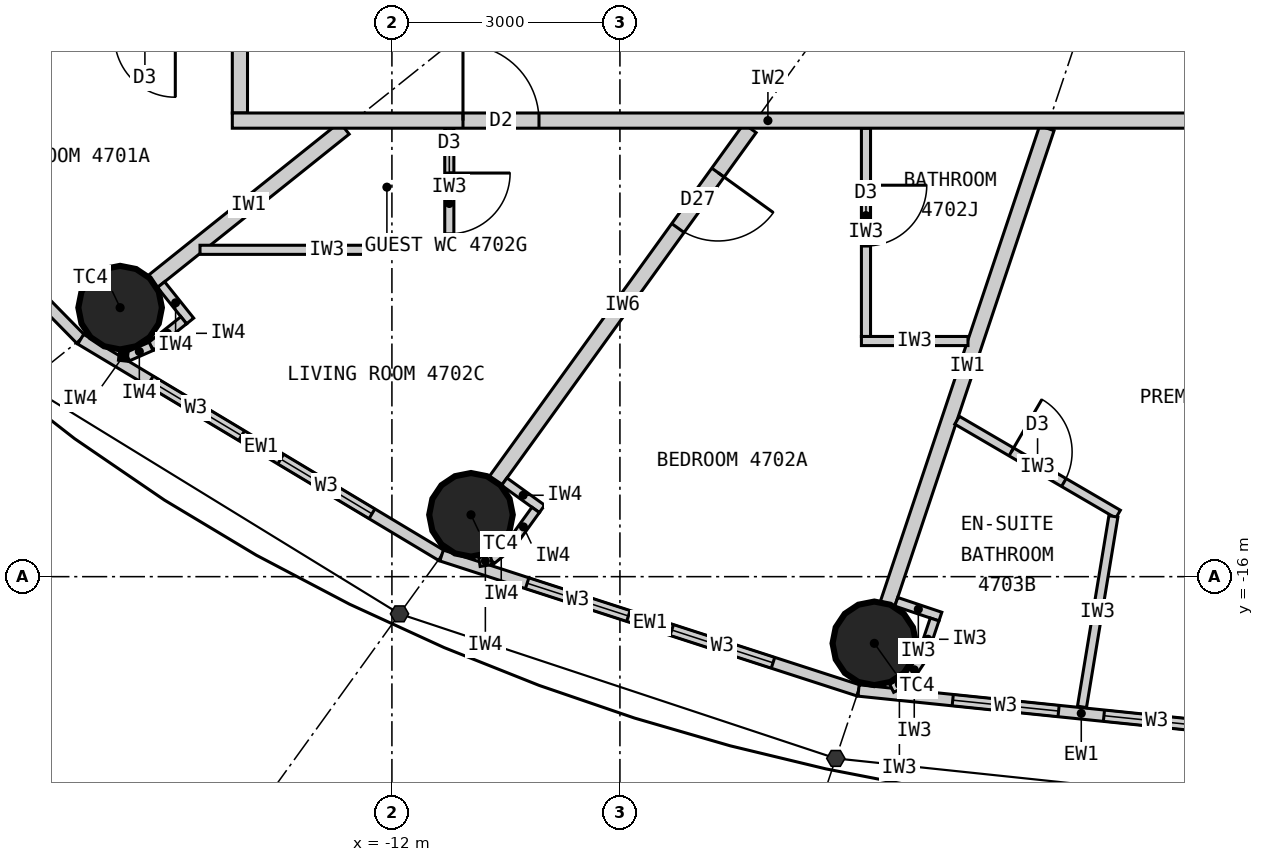
"""IFC4 building model, lengths in metres.
Left out: names, types, materials, properties, quantities, classifications, styles, units other than length and angle.
Written with IfcOpenShell. Run it as: python <this file> out.ifc"""

import sys

from ifc_helpers import new_model, si_unit, direction, frame, frame_2d, origin, origin_2d, place, context, subcontext, project, spatial, rectangle, circle, extrude, element, fill, save


model = new_model("IFC4")
c1 = context("Model", 3, precision=1e-05, world=origin(), true_north=direction((0.0, 1.0)))
c2 = subcontext(c1, "Body", "Model", "MODEL_VIEW")
j1 = project(units=[si_unit("LENGTHUNIT", "METRE"), si_unit("PLANEANGLEUNIT", "RADIAN")], contexts=[c1])
p1 = place(None, origin())
s1 = spatial("IfcSite", under=j1, at=p1, CompositionType="ELEMENT")
p2 = place(p1, origin())
s2 = spatial("IfcBuilding", under=s1, at=p2, CompositionType="ELEMENT")
p3 = place(p2, frame((0.0, 0.0, 176.4)))
s3 = spatial("IfcBuildingStorey", under=s2, at=p3, CompositionType="ELEMENT", Elevation=176.4)
for number, where, z_axis, x_axis in (
    (1, (-15.576, -12.461, 0.0), (0.0, 0.0, 1.0), (1.0, 0.0, 0.0)),
    (2, (-10.96, -15.186, 0.0), (0.0, 0.0, 1.0), (1.0, 0.0, 0.0)),
    (3, (-5.653, -16.877, 0.0), (0.0, 0.0, 1.0), (1.0, 0.0, 0.0)),
):
    element("IfcColumn", number, at=place(p3, frame(where, z_axis=z_axis, x_axis=x_axis)), inside=s3, PredefinedType="COLUMN", context=c2, shape_type="SweptSolid", body=[
        extrude(circle(Radius=0.55, at=origin_2d()), origin(), (0.0, 0.0, 1.0), 3.3),
    ])
p4 = place(p3, frame((-19.772, -9.132, 0.0), z_axis=(0.0, 0.0, 1.0), x_axis=(0.700727467776, -0.71342905457, 0.0)))
e4 = element("IfcWall", 4, at=p4, inside=s3, PredefinedType="ELEMENTEDWALL", context=c2, shape_type="SweptSolid", body=[
    extrude(rectangle(XDim=5.247, YDim=0.15, at=frame_2d((2.624, 0.0))), origin(), (0.0, 0.0, 1.0), 3.12),
])
p5 = place(p4, frame((0.924, 0.0, 0.9)))
e5 = element("IfcOpeningElement", 5, at=p5, cuts=e4, PredefinedType="OPENING", context=c2, shape_type="SweptSolid", body=[
    extrude(rectangle(XDim=1.4, YDim=1.9, at=frame_2d((0.7, 0.95))), frame((0.0, 0.085, 0.0), z_axis=(0.0, -1.0, 0.0), x_axis=(1.0, 0.0, 0.0)), (0.0, 0.0, 1.0), 0.17),
])
p6 = place(p4, frame((2.924, 0.0, 0.9)))
e6 = element("IfcOpeningElement", 6, at=p6, cuts=e4, PredefinedType="OPENING", context=c2, shape_type="SweptSolid", body=[
    extrude(rectangle(XDim=1.4, YDim=1.9, at=frame_2d((0.7, 0.95))), frame((0.0, 0.085, 0.0), z_axis=(0.0, -1.0, 0.0), x_axis=(1.0, 0.0, 0.0)), (0.0, 0.0, 1.0), 0.17),
])
p7 = place(p3, frame((-16.095, -12.876, 0.0), z_axis=(0.0, 0.0, 1.0), x_axis=(0.857695199231, -0.514158482587, 0.0)))
e7 = element("IfcWall", 7, at=p7, inside=s3, PredefinedType="ELEMENTEDWALL", context=c2, shape_type="SweptSolid", body=[
    extrude(rectangle(XDim=5.536, YDim=0.15, at=frame_2d((2.768, 0.0))), origin(), (0.0, 0.0, 1.0), 3.12),
])
p8 = place(p7, frame((1.068, 0.0, 0.9)))
e8 = element("IfcOpeningElement", 8, at=p8, cuts=e7, PredefinedType="OPENING", context=c2, shape_type="SweptSolid", body=[
    extrude(rectangle(XDim=1.4, YDim=1.9, at=frame_2d((0.7, 0.95))), frame((0.0, 0.085, 0.0), z_axis=(0.0, -1.0, 0.0), x_axis=(1.0, 0.0, 0.0)), (0.0, 0.0, 1.0), 0.17),
])
p9 = place(p7, frame((3.068, 0.0, 0.9)))
e9 = element("IfcOpeningElement", 9, at=p9, cuts=e7, PredefinedType="OPENING", context=c2, shape_type="SweptSolid", body=[
    extrude(rectangle(XDim=1.4, YDim=1.9, at=frame_2d((0.7, 0.95))), frame((0.0, 0.085, 0.0), z_axis=(0.0, -1.0, 0.0), x_axis=(1.0, 0.0, 0.0)), (0.0, 0.0, 1.0), 0.17),
])
p10 = place(p3, frame((-11.346, -15.722, 0.0), z_axis=(0.0, 0.0, 1.0), x_axis=(0.951432482129, -0.307857486429, 0.0)))
e10 = element("IfcWall", 10, at=p10, inside=s3, PredefinedType="ELEMENTEDWALL", context=c2, shape_type="SweptSolid", body=[
    extrude(rectangle(XDim=5.766, YDim=0.15, at=frame_2d((2.883, 0.0))), origin(), (0.0, 0.0, 1.0), 3.12),
])
p11 = place(p10, frame((1.183, 0.0, 0.9)))
e11 = element("IfcOpeningElement", 11, at=p11, cuts=e10, PredefinedType="OPENING", context=c2, shape_type="SweptSolid", body=[
    extrude(rectangle(XDim=1.4, YDim=1.9, at=frame_2d((0.7, 0.95))), frame((0.0, 0.085, 0.0), z_axis=(0.0, -1.0, 0.0), x_axis=(1.0, 0.0, 0.0)), (0.0, 0.0, 1.0), 0.17),
])
p12 = place(p10, frame((3.183, 0.0, 0.9)))
e12 = element("IfcOpeningElement", 12, at=p12, cuts=e10, PredefinedType="OPENING", context=c2, shape_type="SweptSolid", body=[
    extrude(rectangle(XDim=1.4, YDim=1.9, at=frame_2d((0.7, 0.95))), frame((0.0, 0.085, 0.0), z_axis=(0.0, -1.0, 0.0), x_axis=(1.0, 0.0, 0.0)), (0.0, 0.0, 1.0), 0.17),
])
p13 = place(p3, frame((-5.86, -17.497, 0.0), z_axis=(0.0, 0.0, 1.0), x_axis=(0.994751738032, -0.102318032045, 0.0)))
e13 = element("IfcWall", 13, at=p13, inside=s3, PredefinedType="ELEMENTEDWALL", context=c2, shape_type="SweptSolid", body=[
    extrude(rectangle(XDim=5.891, YDim=0.15, at=frame_2d((2.946, 0.0))), origin(), (0.0, 0.0, 1.0), 3.12),
])
p14 = place(p13, frame((1.246, 0.0, 0.9)))
e14 = element("IfcOpeningElement", 14, at=p14, cuts=e13, PredefinedType="OPENING", context=c2, shape_type="SweptSolid", body=[
    extrude(rectangle(XDim=1.4, YDim=1.9, at=frame_2d((0.7, 0.95))), frame((0.0, 0.085, 0.0), z_axis=(0.0, -1.0, 0.0), x_axis=(1.0, 0.0, 0.0)), (0.0, 0.0, 1.0), 0.17),
])
p15 = place(p13, frame((3.246, 0.0, 0.9)))
e15 = element("IfcOpeningElement", 15, at=p15, cuts=e13, PredefinedType="OPENING", context=c2, shape_type="SweptSolid", body=[
    extrude(rectangle(XDim=1.4, YDim=1.9, at=frame_2d((0.7, 0.95))), frame((0.0, 0.085, 0.0), z_axis=(0.0, -1.0, 0.0), x_axis=(1.0, 0.0, 0.0)), (0.0, 0.0, 1.0), 0.17),
])
p16 = place(p3, frame((-14.0, 9.9, 0.0), z_axis=(0.0, 0.0, 1.0), x_axis=(0.0, -1.0, 0.0)))
e16 = element("IfcWall", 16, at=p16, inside=s3, PredefinedType="PARTITIONING", context=c2, shape_type="SweptSolid", body=[
    extrude(rectangle(XDim=19.8, YDim=0.2, at=frame_2d((9.9, 0.0))), origin(), (0.0, 0.0, 1.0), 3.12),
])
p17 = place(p16, frame((13.853, 0.0, 0.0)))
e17 = element("IfcOpeningElement", 17, at=p17, cuts=e16, PredefinedType="OPENING", context=c2, shape_type="SweptSolid", body=[
    extrude(rectangle(XDim=1.0, YDim=2.2, at=frame_2d((0.5, 1.1))), frame((0.0, 0.11, 0.0), z_axis=(0.0, -1.0, 0.0), x_axis=(1.0, 0.0, 0.0)), (0.0, 0.0, 1.0), 0.22),
])
p18 = place(p16, frame((1.1, 0.0, 0.0)))
e18 = element("IfcOpeningElement", 18, at=p18, cuts=e16, PredefinedType="OPENING", context=c2, shape_type="SweptSolid", body=[
    extrude(rectangle(XDim=1.0, YDim=2.2, at=frame_2d((0.5, 1.1))), frame((0.0, 0.11, 0.0), z_axis=(0.0, -1.0, 0.0), x_axis=(1.0, 0.0, 0.0)), (0.0, 0.0, 1.0), 0.22),
])
p19 = place(p16, frame((3.688, 0.0, 0.0)))
e19 = element("IfcOpeningElement", 19, at=p19, cuts=e16, PredefinedType="OPENING", context=c2, shape_type="SweptSolid", body=[
    extrude(rectangle(XDim=1.0, YDim=2.2, at=frame_2d((0.5, 1.1))), frame((0.0, 0.11, 0.0), z_axis=(0.0, -1.0, 0.0), x_axis=(1.0, 0.0, 0.0)), (0.0, 0.0, 1.0), 0.22),
])
p20 = place(p16, frame((8.719, 0.0, 0.0)))
e20 = element("IfcOpeningElement", 20, at=p20, cuts=e16, PredefinedType="OPENING", context=c2, shape_type="SweptSolid", body=[
    extrude(rectangle(XDim=1.0, YDim=2.2, at=frame_2d((0.5, 1.1))), frame((0.0, 0.11, 0.0), z_axis=(0.0, -1.0, 0.0), x_axis=(1.0, 0.0, 0.0)), (0.0, 0.0, 1.0), 0.22),
])
p21 = place(p3, frame((-12.625, -10.1, 0.0), z_axis=(0.0, 0.0, 1.0), x_axis=(-0.780876185034, -0.624685827954, 0.0)))
e21 = element("IfcWall", 21, at=p21, inside=s3, PredefinedType="PARTITIONING", context=c2, shape_type="SweptSolid", body=[
    extrude(rectangle(XDim=3.229, YDim=0.2, at=frame_2d((1.615, 0.0))), origin(), (0.0, 0.0, 1.0), 2.42),
])
p22 = place(p3, frame((-7.289, -10.1, 0.0), z_axis=(0.0, 0.0, 1.0), x_axis=(-0.585222595178, -0.810872686735, 0.0)))
e22 = element("IfcWall", 22, at=p22, inside=s3, PredefinedType="PARTITIONING", context=c2, shape_type="SweptSolid", body=[
    extrude(rectangle(XDim=5.722, YDim=0.2, at=frame_2d((2.861, 0.0))), origin(), (0.0, 0.0, 1.0), 2.42),
])
p23 = place(p22, frame((0.72, 0.0, 0.0)))
e23 = element("IfcOpeningElement", 23, at=p23, cuts=e22, PredefinedType="OPENING", context=c2, shape_type="SweptSolid", body=[
    extrude(rectangle(XDim=0.9, YDim=2.1, at=frame_2d((0.45, 1.05))), frame((0.0, 0.11, 0.0), z_axis=(0.0, -1.0, 0.0), x_axis=(1.0, 0.0, 0.0)), (0.0, 0.0, 1.0), 0.22),
])
p24 = place(p3, frame((-3.383, -10.1, 0.0), z_axis=(0.0, 0.0, 1.0), x_axis=(-0.317615120474, -0.948219718866, 0.0)))
e24 = element("IfcWall", 24, at=p24, inside=s3, PredefinedType="PARTITIONING", context=c2, shape_type="SweptSolid", body=[
    extrude(rectangle(XDim=6.597, YDim=0.2, at=frame_2d((3.299, 0.0))), origin(), (0.0, 0.0, 1.0), 2.42),
])
p25 = place(p3, frame((-14.525, -11.7, 0.0), z_axis=(0.0, 0.0, 1.0), x_axis=(1.0, 0.0, 0.0)))
e25 = element("IfcWall", 25, at=p25, inside=s3, PredefinedType="PARTITIONING", context=c2, shape_type="SweptSolid", body=[
    extrude(rectangle(XDim=3.34, YDim=0.12, at=frame_2d((1.67, 0.0))), origin(), (0.0, 0.0, 1.0), 3.12),
])
p26 = place(p3, frame((-11.245, -10.1, 0.0), z_axis=(0.0, 0.0, 1.0), x_axis=(0.0, -1.0, 0.0)))
e26 = element("IfcWall", 26, at=p26, inside=s3, PredefinedType="PARTITIONING", context=c2, shape_type="SweptSolid", body=[
    extrude(rectangle(XDim=1.54, YDim=0.12, at=frame_2d((0.77, 0.0))), origin(), (0.0, 0.0, 1.0), 3.12),
])
p27 = place(p26, frame((0.59, 0.0, 0.0)))
e27 = element("IfcOpeningElement", 27, at=p27, cuts=e26, PredefinedType="OPENING", context=c2, shape_type="SweptSolid", body=[
    extrude(rectangle(XDim=0.8, YDim=2.1, at=frame_2d((0.4, 1.05))), frame((0.0, 0.07, 0.0), z_axis=(0.0, -1.0, 0.0), x_axis=(1.0, 0.0, 0.0)), (0.0, 0.0, 1.0), 0.14),
])
p28 = place(p3, frame((-4.421, -12.9, 0.0), z_axis=(0.0, 0.0, 1.0), x_axis=(-1.0, 0.0, 0.0)))
e28 = element("IfcWall", 28, at=p28, inside=s3, PredefinedType="PARTITIONING", context=c2, shape_type="SweptSolid", body=[
    extrude(rectangle(XDim=1.402, YDim=0.12, at=frame_2d((0.701, 0.0))), origin(), (0.0, 0.0, 1.0), 3.12),
])
p29 = place(p3, frame((-5.763, -10.1, 0.0), z_axis=(0.0, 0.0, 1.0), x_axis=(0.0, -1.0, 0.0)))
e29 = element("IfcWall", 29, at=p29, inside=s3, PredefinedType="PARTITIONING", context=c2, shape_type="SweptSolid", body=[
    extrude(rectangle(XDim=2.74, YDim=0.12, at=frame_2d((1.37, 0.0))), origin(), (0.0, 0.0, 1.0), 3.12),
])
p30 = place(p29, frame((0.75, 0.0, 0.0)))
e30 = element("IfcOpeningElement", 30, at=p30, cuts=e29, PredefinedType="OPENING", context=c2, shape_type="SweptSolid", body=[
    extrude(rectangle(XDim=0.8, YDim=2.1, at=frame_2d((0.4, 1.05))), frame((0.0, 0.07, 0.0), z_axis=(0.0, -1.0, 0.0), x_axis=(1.0, 0.0, 0.0)), (0.0, 0.0, 1.0), 0.14),
])
p31 = place(p3, frame((-4.564, -13.942, 0.0), z_axis=(0.0, 0.0, 1.0), x_axis=(0.863717519451, -0.503976236139, 0.0)))
e31 = element("IfcWall", 31, at=p31, inside=s3, PredefinedType="PARTITIONING", context=c2, shape_type="SweptSolid", body=[
    extrude(rectangle(XDim=2.453, YDim=0.12, at=frame_2d((1.226, 0.0))), origin(), (0.0, 0.0, 1.0), 3.12),
])
p32 = place(p31, frame((0.826, 0.0, 0.0)))
e32 = element("IfcOpeningElement", 32, at=p32, cuts=e31, PredefinedType="OPENING", context=c2, shape_type="SweptSolid", body=[
    extrude(rectangle(XDim=0.8, YDim=2.1, at=frame_2d((0.4, 1.05))), frame((0.0, 0.07, 0.0), z_axis=(0.0, -1.0, 0.0), x_axis=(1.0, 0.0, 0.0)), (0.0, 0.0, 1.0), 0.14),
])
p33 = place(p3, frame((-2.508, -15.207, 0.0), z_axis=(0.0, 0.0, 1.0), x_axis=(-0.162637365963, -0.986685911115, 0.0)))
e33 = element("IfcWall", 33, at=p33, inside=s3, PredefinedType="PARTITIONING", context=c2, shape_type="SweptSolid", body=[
    extrude(rectangle(XDim=2.54, YDim=0.12, at=frame_2d((1.27, 0.0))), origin(), (0.0, 0.0, 1.0), 3.12),
])
p34 = place(p3, frame((-5.364, -16.331, 0.0), z_axis=(0.0, 0.0, 1.0), x_axis=(0.948283770087, -0.317423835572, 0.0)))
e34 = element("IfcWall", 34, at=p34, inside=s3, PredefinedType="PARTITIONING", context=c2, shape_type="SweptSolid", body=[
    extrude(rectangle(XDim=0.612, YDim=0.12, at=frame_2d((0.306, 0.0))), origin(), (0.0, 0.0, 1.0), 3.12),
])
p35 = place(p3, frame((-4.86, -16.563, 0.0), z_axis=(0.0, 0.0, 1.0), x_axis=(-0.317825321803, -0.948149284038, 0.0)))
e35 = element("IfcWall", 35, at=p35, inside=s3, PredefinedType="PARTITIONING", context=c2, shape_type="SweptSolid", body=[
    extrude(rectangle(XDim=0.55, YDim=0.12, at=frame_2d((0.275, 0.0))), origin(), (0.0, 0.0, 1.0), 3.12),
])
p36 = place(p3, frame((-5.034, -17.084, 0.0), z_axis=(0.0, 0.0, 1.0), x_axis=(-0.552362205726, -0.833604218851, 0.0)))
e36 = element("IfcWall", 36, at=p36, inside=s3, PredefinedType="PARTITIONING", context=c2, shape_type="SweptSolid", body=[
    extrude(rectangle(XDim=0.338, YDim=0.12, at=frame_2d((0.169, 0.0))), origin(), (0.0, 0.0, 1.0), 3.12),
])
p37 = place(p3, frame((-5.221, -17.366, 0.0), z_axis=(0.0, 0.0, 1.0), x_axis=(-0.895067896179, -0.445929883759, 0.0)))
e37 = element("IfcWall", 37, at=p37, inside=s3, PredefinedType="PARTITIONING", context=c2, shape_type="SweptSolid", body=[
    extrude(rectangle(XDim=0.228, YDim=0.12, at=frame_2d((0.114, 0.0))), origin(), (0.0, 0.0, 1.0), 3.12),
])
p38 = place(p3, frame((-0.006, -10.0, 0.0), z_axis=(0.0, 0.0, 1.0), x_axis=(-1.0, 0.0, 0.0)))
e38 = element("IfcWall", 38, at=p38, inside=s3, PredefinedType="PARTITIONING", context=c2, shape_type="SweptSolid", body=[
    extrude(rectangle(XDim=14.094, YDim=0.2, at=frame_2d((7.047, 0.0))), origin(), (0.0, 0.0, 1.0), 3.12),
])
p39 = place(p38, frame((10.059, 0.0, 0.0)))
e39 = element("IfcOpeningElement", 39, at=p39, cuts=e38, PredefinedType="OPENING", context=c2, shape_type="SweptSolid", body=[
    extrude(rectangle(XDim=1.0, YDim=2.2, at=frame_2d((0.5, 1.1))), frame((0.0, 0.11, 0.0), z_axis=(0.0, -1.0, 0.0), x_axis=(1.0, 0.0, 0.0)), (0.0, 0.0, 1.0), 0.22),
])
p40 = place(p3, frame((-15.037, -12.158, 0.0), z_axis=(0.0, 0.0, 1.0), x_axis=(0.624840920722, -0.78075208856, 0.0)))
e40 = element("IfcWall", 40, at=p40, inside=s3, PredefinedType="PARTITIONING", context=c2, shape_type="SweptSolid", body=[
    extrude(rectangle(XDim=0.612, YDim=0.12, at=frame_2d((0.306, 0.0))), origin(), (0.0, 0.0, 1.0), 3.12),
])
p41 = place(p3, frame((-14.739, -12.627, 0.0), z_axis=(0.0, 0.0, 1.0), x_axis=(-0.780912119987, -0.624640905527, 0.0)))
e41 = element("IfcWall", 41, at=p41, inside=s3, PredefinedType="PARTITIONING", context=c2, shape_type="SweptSolid", body=[
    extrude(rectangle(XDim=0.55, YDim=0.12, at=frame_2d((0.275, 0.0))), origin(), (0.0, 0.0, 1.0), 3.12),
])
p42 = place(p3, frame((-15.169, -12.97, 0.0), z_axis=(0.0, 0.0, 1.0), x_axis=(-0.915974725257, -0.401235968838, 0.0)))
e42 = element("IfcWall", 42, at=p42, inside=s3, PredefinedType="PARTITIONING", context=c2, shape_type="SweptSolid", body=[
    extrude(rectangle(XDim=0.338, YDim=0.12, at=frame_2d((0.169, 0.0))), origin(), (0.0, 0.0, 1.0), 3.12),
])
p43 = place(p3, frame((-15.478, -13.106, 0.0), z_axis=(0.0, 0.0, 1.0), x_axis=(-0.993778813557, 0.111371763588, 0.0)))
e43 = element("IfcWall", 43, at=p43, inside=s3, PredefinedType="PARTITIONING", context=c2, shape_type="SweptSolid", body=[
    extrude(rectangle(XDim=0.114, YDim=0.12, at=frame_2d((0.057, 0.0))), origin(), (0.0, 0.0, 1.0), 3.12),
])
p44 = place(p3, frame((-10.522, -14.75, 0.0), z_axis=(0.0, 0.0, 1.0), x_axis=(0.811057588427, -0.584966313777, 0.0)))
e44 = element("IfcWall", 44, at=p44, inside=s3, PredefinedType="PARTITIONING", context=c2, shape_type="SweptSolid", body=[
    extrude(rectangle(XDim=0.612, YDim=0.12, at=frame_2d((0.306, 0.0))), origin(), (0.0, 0.0, 1.0), 3.12),
])
p45 = place(p3, frame((-10.109, -15.122, 0.0), z_axis=(0.0, 0.0, 1.0), x_axis=(-0.585344718358, -0.810784534072, 0.0)))
e45 = element("IfcWall", 45, at=p45, inside=s3, PredefinedType="PARTITIONING", context=c2, shape_type="SweptSolid", body=[
    extrude(rectangle(XDim=0.55, YDim=0.12, at=frame_2d((0.275, 0.0))), origin(), (0.0, 0.0, 1.0), 3.12),
])
p46 = place(p3, frame((-10.431, -15.568, 0.0), z_axis=(0.0, 0.0, 1.0), x_axis=(-0.77505137267, -0.631898227345, 0.0)))
e46 = element("IfcWall", 46, at=p46, inside=s3, PredefinedType="PARTITIONING", context=c2, shape_type="SweptSolid", body=[
    extrude(rectangle(XDim=0.338, YDim=0.12, at=frame_2d((0.169, 0.0))), origin(), (0.0, 0.0, 1.0), 3.12),
])
p47 = place(p3, frame((-10.693, -15.781, 0.0), z_axis=(0.0, 0.0, 1.0), x_axis=(-0.987256785332, -0.159135287777, 0.0)))
e47 = element("IfcWall", 47, at=p47, inside=s3, PredefinedType="PARTITIONING", context=c2, shape_type="SweptSolid", body=[
    extrude(rectangle(XDim=0.158, YDim=0.12, at=frame_2d((0.079, 0.0))), origin(), (0.0, 0.0, 1.0), 3.12),
])
p48 = place(p8, origin())
e48 = element("IfcWindow", 48, at=p48, inside=s3, PartitioningType="SINGLE_PANEL", PredefinedType="WINDOW", context=c2, shape_type="SweptSolid", body=[
    extrude(rectangle(XDim=1.4, YDim=1.9, at=frame_2d((0.7, 0.95))), frame((0.0, 0.03, 0.0), z_axis=(0.0, -1.0, 0.0), x_axis=(1.0, 0.0, 0.0)), (0.0, 0.0, 1.0), 0.06),
])
fill(e8, e48)
p49 = place(p9, origin())
e49 = element("IfcWindow", 49, at=p49, inside=s3, PartitioningType="SINGLE_PANEL", PredefinedType="WINDOW", context=c2, shape_type="SweptSolid", body=[
    extrude(rectangle(XDim=1.4, YDim=1.9, at=frame_2d((0.7, 0.95))), frame((0.0, 0.03, 0.0), z_axis=(0.0, -1.0, 0.0), x_axis=(1.0, 0.0, 0.0)), (0.0, 0.0, 1.0), 0.06),
])
fill(e9, e49)
p50 = place(p11, origin())
e50 = element("IfcWindow", 50, at=p50, inside=s3, PartitioningType="SINGLE_PANEL", PredefinedType="WINDOW", context=c2, shape_type="SweptSolid", body=[
    extrude(rectangle(XDim=1.4, YDim=1.9, at=frame_2d((0.7, 0.95))), frame((0.0, 0.03, 0.0), z_axis=(0.0, -1.0, 0.0), x_axis=(1.0, 0.0, 0.0)), (0.0, 0.0, 1.0), 0.06),
])
fill(e11, e50)
p51 = place(p12, origin())
e51 = element("IfcWindow", 51, at=p51, inside=s3, PartitioningType="SINGLE_PANEL", PredefinedType="WINDOW", context=c2, shape_type="SweptSolid", body=[
    extrude(rectangle(XDim=1.4, YDim=1.9, at=frame_2d((0.7, 0.95))), frame((0.0, 0.03, 0.0), z_axis=(0.0, -1.0, 0.0), x_axis=(1.0, 0.0, 0.0)), (0.0, 0.0, 1.0), 0.06),
])
fill(e12, e51)
p52 = place(p14, origin())
e52 = element("IfcWindow", 52, at=p52, inside=s3, PartitioningType="SINGLE_PANEL", PredefinedType="WINDOW", context=c2, shape_type="SweptSolid", body=[
    extrude(rectangle(XDim=1.4, YDim=1.9, at=frame_2d((0.7, 0.95))), frame((0.0, 0.03, 0.0), z_axis=(0.0, -1.0, 0.0), x_axis=(1.0, 0.0, 0.0)), (0.0, 0.0, 1.0), 0.06),
])
fill(e14, e52)
p53 = place(p15, origin())
e53 = element("IfcWindow", 53, at=p53, inside=s3, PartitioningType="SINGLE_PANEL", PredefinedType="WINDOW", context=c2, shape_type="SweptSolid", body=[
    extrude(rectangle(XDim=1.4, YDim=1.9, at=frame_2d((0.7, 0.95))), frame((0.0, 0.03, 0.0), z_axis=(0.0, -1.0, 0.0), x_axis=(1.0, 0.0, 0.0)), (0.0, 0.0, 1.0), 0.06),
])
fill(e15, e53)
p54 = place(p27, origin())
e54 = element("IfcDoor", 54, at=p54, inside=s3, OperationType="SINGLE_SWING_LEFT", PredefinedType="DOOR", context=c2, shape_type="SweptSolid", body=[
    extrude(rectangle(XDim=0.8, YDim=2.1, at=frame_2d((0.4, 1.05))), frame((0.0, 0.025, 0.0), z_axis=(0.0, -1.0, 0.0), x_axis=(1.0, 0.0, 0.0)), (0.0, 0.0, 1.0), 0.05),
])
fill(e27, e54)
p55 = place(p39, origin())
e55 = element("IfcDoor", 55, at=p55, inside=s3, OperationType="SINGLE_SWING_RIGHT", PredefinedType="DOOR", context=c2, shape_type="SweptSolid", body=[
    extrude(rectangle(XDim=1.0, YDim=2.2, at=frame_2d((0.5, 1.1))), frame((0.0, 0.025, 0.0), z_axis=(0.0, -1.0, 0.0), x_axis=(1.0, 0.0, 0.0)), (0.0, 0.0, 1.0), 0.05),
])
fill(e39, e55)
p56 = place(p30, origin())
e56 = element("IfcDoor", 56, at=p56, inside=s3, OperationType="SINGLE_SWING_LEFT", PredefinedType="DOOR", context=c2, shape_type="SweptSolid", body=[
    extrude(rectangle(XDim=0.8, YDim=2.1, at=frame_2d((0.4, 1.05))), frame((0.0, 0.025, 0.0), z_axis=(0.0, -1.0, 0.0), x_axis=(1.0, 0.0, 0.0)), (0.0, 0.0, 1.0), 0.05),
])
fill(e30, e56)
p57 = place(p23, origin())
e57 = element("IfcDoor", 57, at=p57, inside=s3, OperationType="SINGLE_SWING_LEFT", PredefinedType="DOOR", context=c2, shape_type="SweptSolid", body=[
    extrude(rectangle(XDim=0.9, YDim=2.1, at=frame_2d((0.45, 1.05))), frame((0.0, 0.025, 0.0), z_axis=(0.0, -1.0, 0.0), x_axis=(1.0, 0.0, 0.0)), (0.0, 0.0, 1.0), 0.05),
])
fill(e23, e57)
p58 = place(p32, origin())
e58 = element("IfcDoor", 58, at=p58, inside=s3, OperationType="SINGLE_SWING_LEFT", PredefinedType="DOOR", context=c2, shape_type="SweptSolid", body=[
    extrude(rectangle(XDim=0.8, YDim=2.1, at=frame_2d((0.4, 1.05))), frame((0.0, 0.025, 0.0), z_axis=(0.0, -1.0, 0.0), x_axis=(1.0, 0.0, 0.0)), (0.0, 0.0, 1.0), 0.05),
])
fill(e32, e58)
save(model, sys.argv[1])
